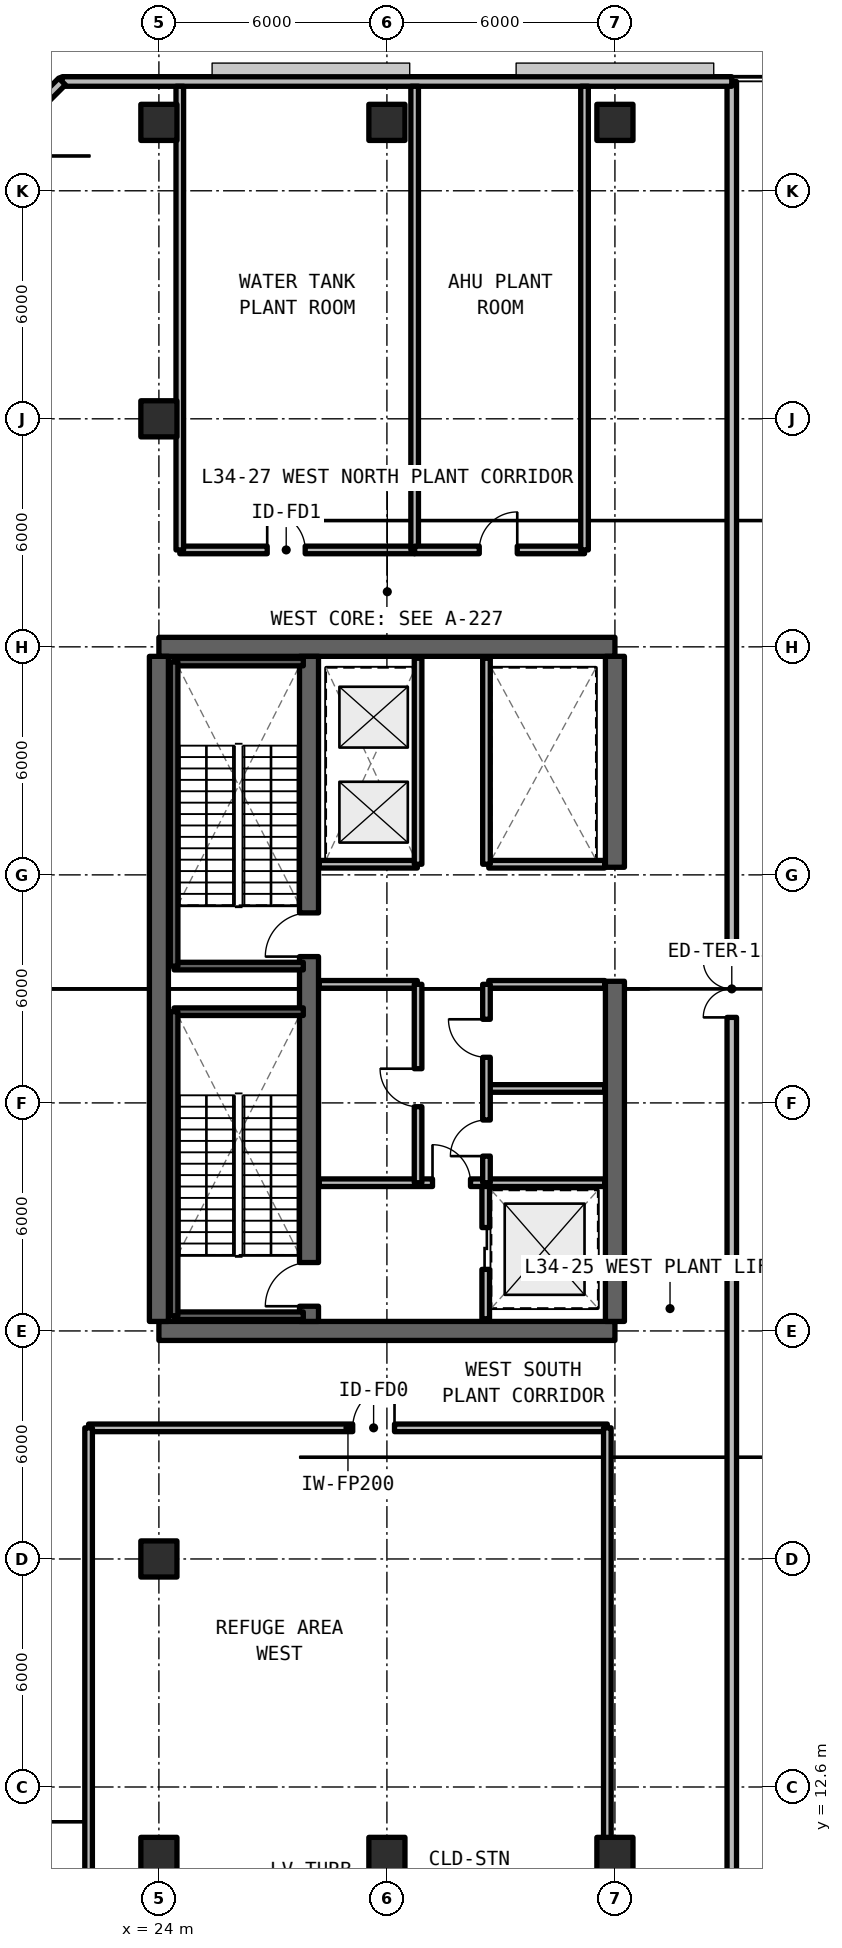
"""IFC4 building model, lengths in metres.
Left out: names, types, materials, properties, quantities, classifications, styles, units other than length and angle.
Written with IfcOpenShell. Run it as: python <this file> out.ifc"""

import sys

from ifc_helpers import new_model, si_unit, direction, frame, frame_2d, origin, origin_2d, place, context, subcontext, project, spatial, rectangle, extrude, element, fill, save


model = new_model("IFC4")
c1 = context("Model", 3, precision=1e-05, world=origin(), true_north=direction((0.0, 1.0)))
c2 = subcontext(c1, "Body", "Model", "MODEL_VIEW")
j1 = project(units=[si_unit("LENGTHUNIT", "METRE"), si_unit("PLANEANGLEUNIT", "RADIAN")], contexts=[c1])
p1 = place(None, origin())
s1 = spatial("IfcSite", under=j1, at=p1, CompositionType="ELEMENT")
p2 = place(p1, origin())
s2 = spatial("IfcBuilding", under=s1, at=p2, CompositionType="ELEMENT")
p3 = place(p2, frame((0.0, 0.0, 123.09)))
s3 = spatial("IfcBuildingStorey", under=s2, at=p3, CompositionType="ELEMENT", Elevation=123.09)
for number, where, z_axis, x_axis in (
    (1, (24.0, 24.6, 0.0), (0.0, 0.0, 1.0), (1.0, 0.0, 0.0)),
    (2, (36.0, 42.6, 0.0), (0.0, 0.0, 1.0), (-1.0, 0.0, 0.0)),
):
    element("IfcWall", number, at=place(p3, frame(where, z_axis=z_axis, x_axis=x_axis)), inside=s3, PredefinedType="SHEAR", context=c2, shape_type="SweptSolid", body=[
        extrude(rectangle(XDim=12.0, YDim=0.5, at=frame_2d((6.0, 0.0))), origin(), (0.0, 0.0, 1.0), 4.95),
    ])
p4 = place(p3, frame((24.0, 24.85, 0.0), z_axis=(0.0, 0.0, 1.0), x_axis=(0.0, 1.0, 0.0)))
e3 = element("IfcWall", 3, at=p4, inside=s3, PredefinedType="SHEAR", context=c2, shape_type="SweptSolid", body=[
    extrude(rectangle(XDim=17.5, YDim=0.5, at=frame_2d((8.75, 0.0))), origin(), (0.0, 0.0, 1.0), 4.95),
])
p5 = place(p3, frame((36.0, 24.85, 0.0), z_axis=(0.0, 0.0, 1.0), x_axis=(0.0, 1.0, 0.0)))
e4 = element("IfcWall", 4, at=p5, inside=s3, PredefinedType="SHEAR", context=c2, shape_type="SweptSolid", body=[
    extrude(rectangle(XDim=8.95, YDim=0.5, at=frame_2d((4.475, 0.0))), origin(), (0.0, 0.0, 1.0), 4.95),
])
p6 = place(p3, frame((36.0, 36.8, 0.0), z_axis=(0.0, 0.0, 1.0), x_axis=(0.0, 1.0, 0.0)))
e5 = element("IfcWall", 5, at=p6, inside=s3, PredefinedType="SHEAR", context=c2, shape_type="SweptSolid", body=[
    extrude(rectangle(XDim=5.55, YDim=0.5, at=frame_2d((2.775, 0.0))), origin(), (0.0, 0.0, 1.0), 4.95),
])
p7 = place(p3, frame((27.95, 24.85, 0.0), z_axis=(0.0, 0.0, 1.0), x_axis=(0.0, 1.0, 0.0)))
e6 = element("IfcWall", 6, at=p7, inside=s3, PredefinedType="SHEAR", context=c2, shape_type="SweptSolid", body=[
    extrude(rectangle(XDim=17.5, YDim=0.5, at=frame_2d((8.75, 0.0))), origin(), (0.0, 0.0, 1.0), 4.95),
])
p8 = place(p7, frame((0.4, 0.0, 0.0)))
e7 = element("IfcOpeningElement", 7, at=p8, cuts=e6, PredefinedType="OPENING", context=c2, shape_type="SweptSolid", body=[
    extrude(rectangle(XDim=1.15, YDim=2.15, at=frame_2d((0.575, 1.075))), frame((0.0, 0.26, 0.0), z_axis=(0.0, -1.0, 0.0), x_axis=(1.0, 0.0, 0.0)), (0.0, 0.0, 1.0), 0.52),
])
p9 = place(p7, frame((9.6, 0.0, 0.0)))
e8 = element("IfcOpeningElement", 8, at=p9, cuts=e6, PredefinedType="OPENING", context=c2, shape_type="SweptSolid", body=[
    extrude(rectangle(XDim=1.15, YDim=2.15, at=frame_2d((0.575, 1.075))), frame((0.0, 0.26, 0.0), z_axis=(0.0, -1.0, 0.0), x_axis=(1.0, 0.0, 0.0)), (0.0, 0.0, 1.0), 0.52),
])
for number, where, z_axis, x_axis in (
    (9, (24.0, 18.6, 0.0), (0.0, 0.0, 1.0), (1.0, 0.0, 0.0)),
    (10, (24.0, 48.6, 0.0), (0.0, 0.0, 1.0), (1.0, 0.0, 0.0)),
):
    element("IfcColumn", number, at=place(p3, frame(where, z_axis=z_axis, x_axis=x_axis)), inside=s3, PredefinedType="COLUMN", context=c2, shape_type="SweptSolid", body=[
        extrude(rectangle(XDim=0.95, YDim=0.95, at=origin_2d()), origin(), (0.0, 0.0, 1.0), 4.95),
    ])
for number, where, z_axis, x_axis in (
    (11, (24.0, 10.8, 0.0), (0.0, 0.0, 1.0), (1.0, 0.0, 0.0)),
    (12, (24.0, 56.4, 0.0), (0.0, 0.0, 1.0), (1.0, 0.0, 0.0)),
    (13, (30.0, 10.8, 0.0), (0.0, 0.0, 1.0), (1.0, 0.0, 0.0)),
    (14, (30.0, 56.4, 0.0), (0.0, 0.0, 1.0), (1.0, 0.0, 0.0)),
    (15, (36.0, 10.8, 0.0), (0.0, 0.0, 1.0), (1.0, 0.0, 0.0)),
    (16, (36.0, 56.4, 0.0), (0.0, 0.0, 1.0), (1.0, 0.0, 0.0)),
):
    element("IfcColumn", number, at=place(p3, frame(where, z_axis=z_axis, x_axis=x_axis)), inside=s3, PredefinedType="COLUMN", context=c2, shape_type="SweptSolid", body=[
        extrude(rectangle(XDim=0.95, YDim=0.95, at=origin_2d()), origin(), (0.0, 0.0, 1.0), 4.67),
    ])
p10 = place(p3, frame((39.075, 9.725, 0.0), z_axis=(0.0, 0.0, 1.0), x_axis=(0.0, 1.0, 0.0)))
e17 = element("IfcWall", 17, at=p10, inside=s3, PredefinedType="SOLIDWALL", context=c2, shape_type="SweptSolid", body=[
    extrude(rectangle(XDim=47.75, YDim=0.25, at=frame_2d((23.875, 0.0))), origin(), (0.0, 0.0, 1.0), 4.67),
])
p11 = place(p10, frame((23.125, 0.0, 0.0)))
e18 = element("IfcOpeningElement", 18, at=p11, cuts=e17, PredefinedType="OPENING", context=c2, shape_type="SweptSolid", body=[
    extrude(rectangle(XDim=1.5, YDim=2.2, at=frame_2d((0.75, 1.1))), frame((0.0, 0.135, 0.0), z_axis=(0.0, -1.0, 0.0), x_axis=(1.0, 0.0, 0.0)), (0.0, 0.0, 1.0), 0.27),
])
p12 = place(p3, frame((39.075, 57.475, 0.0), z_axis=(0.0, 0.0, 1.0), x_axis=(-1.0, 0.0, 0.0)))
e19 = element("IfcWall", 19, at=p12, inside=s3, PredefinedType="SOLIDWALL", context=c2, shape_type="SweptSolid", body=[
    extrude(rectangle(XDim=17.623, YDim=0.25, at=frame_2d((8.812, 0.0))), origin(), (0.0, 0.0, 1.0), 4.67),
])
p13 = place(p3, frame((21.452, 57.475, 0.0), z_axis=(0.0, 0.0, 1.0), x_axis=(-0.707106781187, -0.707106781187, 0.0)))
e20 = element("IfcWall", 20, at=p13, inside=s3, PredefinedType="SOLIDWALL", context=c2, shape_type="SweptSolid", body=[
    extrude(rectangle(XDim=5.836, YDim=0.25, at=frame_2d((2.918, 0.0))), origin(), (0.0, 0.0, 1.0), 4.67),
])
p14 = place(p3, frame((17.325, 13.852, 0.0), z_axis=(0.0, 0.0, 1.0), x_axis=(0.707127696864, -0.70708586489, 0.0)))
e21 = element("IfcWall", 21, at=p14, inside=s3, PredefinedType="SOLIDWALL", context=c2, shape_type="SweptSolid", body=[
    extrude(rectangle(XDim=5.836, YDim=0.25, at=frame_2d((2.918, 0.0))), origin(), (0.0, 0.0, 1.0), 4.67),
])
p15 = place(p3, frame((32.6, 24.92, 0.0), z_axis=(0.0, 0.0, 1.0), x_axis=(0.0, 1.0, 0.0)))
e22 = element("IfcWall", 22, at=p15, inside=s3, PredefinedType="SOLIDWALL", context=c2, shape_type="SweptSolid", body=[
    extrude(rectangle(XDim=3.58, YDim=0.2, at=frame_2d((1.79, 0.0))), origin(), (0.0, 0.0, 1.0), 3.89),
])
p16 = place(p15, frame((1.3, 0.0, 0.0)))
e23 = element("IfcOpeningElement", 23, at=p16, cuts=e22, PredefinedType="OPENING", context=c2, shape_type="SweptSolid", body=[
    extrude(rectangle(XDim=1.1, YDim=2.2, at=frame_2d((0.55, 1.1))), frame((0.0, 0.11, 0.0), z_axis=(0.0, -1.0, 0.0), x_axis=(1.0, 0.0, 0.0)), (0.0, 0.0, 1.0), 0.22),
])
p17 = place(p3, frame((28.22, 28.5, 0.0), z_axis=(0.0, 0.0, 1.0), x_axis=(1.0, 0.0, 0.0)))
e24 = element("IfcWall", 24, at=p17, inside=s3, PredefinedType="SOLIDWALL", context=c2, shape_type="SweptSolid", body=[
    extrude(rectangle(XDim=7.51, YDim=0.2, at=frame_2d((3.755, 0.0))), origin(), (0.0, 0.0, 1.0), 3.89),
])
p18 = place(p17, frame((2.98, 0.0, 0.0)))
e25 = element("IfcOpeningElement", 25, at=p18, cuts=e24, PredefinedType="OPENING", context=c2, shape_type="SweptSolid", body=[
    extrude(rectangle(XDim=1.0, YDim=2.15, at=frame_2d((0.5, 1.075))), frame((0.0, 0.11, 0.0), z_axis=(0.0, -1.0, 0.0), x_axis=(1.0, 0.0, 0.0)), (0.0, 0.0, 1.0), 0.22),
])
p19 = place(p3, frame((28.22, 33.72, 0.0), z_axis=(0.0, 0.0, 1.0), x_axis=(1.0, 0.0, 0.0)))
e26 = element("IfcWall", 26, at=p19, inside=s3, PredefinedType="SOLIDWALL", context=c2, shape_type="SweptSolid", body=[
    extrude(rectangle(XDim=2.58, YDim=0.2, at=frame_2d((1.29, 0.0))), origin(), (0.0, 0.0, 1.0), 3.89),
])
p20 = place(p3, frame((30.82, 28.5, 0.0), z_axis=(0.0, 0.0, 1.0), x_axis=(0.0, 1.0, 0.0)))
e27 = element("IfcWall", 27, at=p20, inside=s3, PredefinedType="SOLIDWALL", context=c2, shape_type="SweptSolid", body=[
    extrude(rectangle(XDim=5.22, YDim=0.2, at=frame_2d((2.61, 0.0))), origin(), (0.0, 0.0, 1.0), 3.89),
])
p21 = place(p20, frame((2.0, 0.0, 0.0)))
e28 = element("IfcOpeningElement", 28, at=p21, cuts=e27, PredefinedType="OPENING", context=c2, shape_type="SweptSolid", body=[
    extrude(rectangle(XDim=1.0, YDim=2.15, at=frame_2d((0.5, 1.075))), frame((0.0, 0.11, 0.0), z_axis=(0.0, -1.0, 0.0), x_axis=(1.0, 0.0, 0.0)), (0.0, 0.0, 1.0), 0.22),
])
for number, where, z_axis, x_axis in (
    (29, (32.68, 30.98, 0.0), (0.0, 0.0, 1.0), (1.0, 0.0, 0.0)),
    (30, (32.68, 33.72, 0.0), (0.0, 0.0, 1.0), (1.0, 0.0, 0.0)),
):
    element("IfcWall", number, at=place(p3, frame(where, z_axis=z_axis, x_axis=x_axis)), inside=s3, PredefinedType="SOLIDWALL", context=c2, shape_type="SweptSolid", body=[
        extrude(rectangle(XDim=3.05, YDim=0.2, at=frame_2d((1.525, 0.0))), origin(), (0.0, 0.0, 1.0), 3.89),
    ])
p22 = place(p3, frame((32.62, 28.5, 0.0), z_axis=(0.0, 0.0, 1.0), x_axis=(0.0, 1.0, 0.0)))
e31 = element("IfcWall", 31, at=p22, inside=s3, PredefinedType="SOLIDWALL", context=c2, shape_type="SweptSolid", body=[
    extrude(rectangle(XDim=5.22, YDim=0.2, at=frame_2d((2.61, 0.0))), origin(), (0.0, 0.0, 1.0), 3.89),
])
p23 = place(p22, frame((0.7, 0.0, 0.0)))
e32 = element("IfcOpeningElement", 32, at=p23, cuts=e31, PredefinedType="OPENING", context=c2, shape_type="SweptSolid", body=[
    extrude(rectangle(XDim=0.95, YDim=2.15, at=frame_2d((0.475, 1.075))), frame((0.0, 0.11, 0.0), z_axis=(0.0, -1.0, 0.0), x_axis=(1.0, 0.0, 0.0)), (0.0, 0.0, 1.0), 0.22),
])
p24 = place(p22, frame((3.3, 0.0, 0.0)))
e33 = element("IfcOpeningElement", 33, at=p24, cuts=e31, PredefinedType="OPENING", context=c2, shape_type="SweptSolid", body=[
    extrude(rectangle(XDim=1.0, YDim=2.15, at=frame_2d((0.5, 1.075))), frame((0.0, 0.11, 0.0), z_axis=(0.0, -1.0, 0.0), x_axis=(1.0, 0.0, 0.0)), (0.0, 0.0, 1.0), 0.22),
])
p25 = place(p3, frame((28.22, 36.88, 0.0), z_axis=(0.0, 0.0, 1.0), x_axis=(1.0, 0.0, 0.0)))
e34 = element("IfcWall", 34, at=p25, inside=s3, PredefinedType="SOLIDWALL", context=c2, shape_type="SweptSolid", body=[
    extrude(rectangle(XDim=2.58, YDim=0.2, at=frame_2d((1.29, 0.0))), origin(), (0.0, 0.0, 1.0), 3.89),
])
p26 = place(p3, frame((30.82, 36.88, 0.0), z_axis=(0.0, 0.0, 1.0), x_axis=(0.0, 1.0, 0.0)))
e35 = element("IfcWall", 35, at=p26, inside=s3, PredefinedType="SOLIDWALL", context=c2, shape_type="SweptSolid", body=[
    extrude(rectangle(XDim=5.42, YDim=0.2, at=frame_2d((2.71, 0.0))), origin(), (0.0, 0.0, 1.0), 3.89),
])
p27 = place(p3, frame((32.68, 36.88, 0.0), z_axis=(0.0, 0.0, 1.0), x_axis=(1.0, 0.0, 0.0)))
e36 = element("IfcWall", 36, at=p27, inside=s3, PredefinedType="SOLIDWALL", context=c2, shape_type="SweptSolid", body=[
    extrude(rectangle(XDim=3.05, YDim=0.2, at=frame_2d((1.525, 0.0))), origin(), (0.0, 0.0, 1.0), 3.89),
])
p28 = place(p3, frame((32.62, 36.88, 0.0), z_axis=(0.0, 0.0, 1.0), x_axis=(0.0, 1.0, 0.0)))
e37 = element("IfcWall", 37, at=p28, inside=s3, PredefinedType="SOLIDWALL", context=c2, shape_type="SweptSolid", body=[
    extrude(rectangle(XDim=5.42, YDim=0.2, at=frame_2d((2.71, 0.0))), origin(), (0.0, 0.0, 1.0), 3.89),
])
p29 = place(p3, frame((22.15, 22.05, 0.0), z_axis=(0.0, 0.0, 1.0), x_axis=(1.0, 0.0, 0.0)))
e38 = element("IfcWall", 38, at=p29, inside=s3, PredefinedType="SOLIDWALL", context=c2, shape_type="SweptSolid", body=[
    extrude(rectangle(XDim=13.65, YDim=0.2, at=frame_2d((6.825, 0.0))), origin(), (0.0, 0.0, 1.0), 3.89),
])
p30 = place(p29, frame((6.95, 0.0, 0.0)))
e39 = element("IfcOpeningElement", 39, at=p30, cuts=e38, PredefinedType="OPENING", context=c2, shape_type="SweptSolid", body=[
    extrude(rectangle(XDim=1.1, YDim=2.15, at=frame_2d((0.55, 1.075))), frame((0.0, 0.11, 0.0), z_axis=(0.0, -1.0, 0.0), x_axis=(1.0, 0.0, 0.0)), (0.0, 0.0, 1.0), 0.22),
])
p31 = place(p3, frame((22.15, 9.85, 0.0), z_axis=(0.0, 0.0, 1.0), x_axis=(0.0, 1.0, 0.0)))
e40 = element("IfcWall", 40, at=p31, inside=s3, PredefinedType="SOLIDWALL", context=c2, shape_type="SweptSolid", body=[
    extrude(rectangle(XDim=12.2, YDim=0.2, at=frame_2d((6.1, 0.0))), origin(), (0.0, 0.0, 1.0), 3.89),
])
p32 = place(p3, frame((35.8, 9.85, 0.0), z_axis=(0.0, 0.0, 1.0), x_axis=(0.0, 1.0, 0.0)))
e41 = element("IfcWall", 41, at=p32, inside=s3, PredefinedType="SOLIDWALL", context=c2, shape_type="SweptSolid", body=[
    extrude(rectangle(XDim=12.2, YDim=0.2, at=frame_2d((6.1, 0.0))), origin(), (0.0, 0.0, 1.0), 3.647),
])
p33 = place(p3, frame((24.55, 45.15, 0.0), z_axis=(0.0, 0.0, 1.0), x_axis=(1.0, 0.0, 0.0)))
e42 = element("IfcWall", 42, at=p33, inside=s3, PredefinedType="SOLIDWALL", context=c2, shape_type="SweptSolid", body=[
    extrude(rectangle(XDim=6.18, YDim=0.2, at=frame_2d((3.09, 0.0))), origin(), (0.0, 0.0, 1.0), 3.89),
])
p34 = place(p33, frame((2.3, 0.0, 0.0)))
e43 = element("IfcOpeningElement", 43, at=p34, cuts=e42, PredefinedType="OPENING", context=c2, shape_type="SweptSolid", body=[
    extrude(rectangle(XDim=1.0, YDim=2.15, at=frame_2d((0.5, 1.075))), frame((0.0, 0.11, 0.0), z_axis=(0.0, -1.0, 0.0), x_axis=(1.0, 0.0, 0.0)), (0.0, 0.0, 1.0), 0.22),
])
for number, where, z_axis, x_axis in (
    (44, (24.55, 45.15, 0.0), (0.0, 0.0, 1.0), (0.0, 1.0, 0.0)),
    (45, (30.73, 45.15, 0.0), (0.0, 0.0, 1.0), (0.0, 1.0, 0.0)),
):
    element("IfcWall", number, at=place(p3, frame(where, z_axis=z_axis, x_axis=x_axis)), inside=s3, PredefinedType="SOLIDWALL", context=c2, shape_type="SweptSolid", body=[
        extrude(rectangle(XDim=12.2, YDim=0.2, at=frame_2d((6.1, 0.0))), origin(), (0.0, 0.0, 1.0), 3.89),
    ])
p35 = place(p3, frame((30.73, 45.15, 0.0), z_axis=(0.0, 0.0, 1.0), x_axis=(1.0, 0.0, 0.0)))
e46 = element("IfcWall", 46, at=p35, inside=s3, PredefinedType="SOLIDWALL", context=c2, shape_type="SweptSolid", body=[
    extrude(rectangle(XDim=4.47, YDim=0.2, at=frame_2d((2.235, 0.0))), origin(), (0.0, 0.0, 1.0), 3.89),
])
p36 = place(p35, frame((1.7, 0.0, 0.0)))
e47 = element("IfcOpeningElement", 47, at=p36, cuts=e46, PredefinedType="OPENING", context=c2, shape_type="SweptSolid", body=[
    extrude(rectangle(XDim=1.0, YDim=2.15, at=frame_2d((0.5, 1.075))), frame((0.0, 0.11, 0.0), z_axis=(0.0, -1.0, 0.0), x_axis=(1.0, 0.0, 0.0)), (0.0, 0.0, 1.0), 0.22),
])
p37 = place(p3, frame((35.2, 45.15, 0.0), z_axis=(0.0, 0.0, 1.0), x_axis=(0.0, 1.0, 0.0)))
e48 = element("IfcWall", 48, at=p37, inside=s3, PredefinedType="SOLIDWALL", context=c2, shape_type="SweptSolid", body=[
    extrude(rectangle(XDim=12.2, YDim=0.2, at=frame_2d((6.1, 0.0))), origin(), (0.0, 0.0, 1.0), 3.89),
])
for number, where, z_axis, x_axis in (
    (49, (24.4, 25.0, 0.0), (0.0, 0.0, 1.0), (1.0, 0.0, 0.0)),
    (50, (27.8, 33.0, 0.0), (0.0, 0.0, 1.0), (-1.0, 0.0, 0.0)),
):
    element("IfcWall", number, at=place(p3, frame(where, z_axis=z_axis, x_axis=x_axis)), inside=s3, PredefinedType="SOLIDWALL", context=c2, shape_type="SweptSolid", body=[
        extrude(rectangle(XDim=3.4, YDim=0.2, at=frame_2d((1.7, 0.0))), origin(), (0.0, 0.0, 1.0), 4.95),
    ])
p38 = place(p3, frame((24.4, 33.0, 0.0), z_axis=(0.0, 0.0, 1.0), x_axis=(0.0, -1.0, 0.0)))
e51 = element("IfcWall", 51, at=p38, inside=s3, PredefinedType="SOLIDWALL", context=c2, shape_type="SweptSolid", body=[
    extrude(rectangle(XDim=8.0, YDim=0.2, at=frame_2d((4.0, 0.0))), origin(), (0.0, 0.0, 1.0), 4.95),
])
for number, where, z_axis, x_axis in (
    (52, (24.4, 34.2, 0.0), (0.0, 0.0, 1.0), (1.0, 0.0, 0.0)),
    (53, (27.8, 42.2, 0.0), (0.0, 0.0, 1.0), (-1.0, 0.0, 0.0)),
):
    element("IfcWall", number, at=place(p3, frame(where, z_axis=z_axis, x_axis=x_axis)), inside=s3, PredefinedType="SOLIDWALL", context=c2, shape_type="SweptSolid", body=[
        extrude(rectangle(XDim=3.4, YDim=0.2, at=frame_2d((1.7, 0.0))), origin(), (0.0, 0.0, 1.0), 4.95),
    ])
p39 = place(p3, frame((24.4, 42.2, 0.0), z_axis=(0.0, 0.0, 1.0), x_axis=(0.0, -1.0, 0.0)))
e54 = element("IfcWall", 54, at=p39, inside=s3, PredefinedType="SOLIDWALL", context=c2, shape_type="SweptSolid", body=[
    extrude(rectangle(XDim=8.0, YDim=0.2, at=frame_2d((4.0, 0.0))), origin(), (0.0, 0.0, 1.0), 4.95),
])
p40 = place(p11, origin())
e55 = element("IfcDoor", 55, at=p40, inside=s3, OperationType="SINGLE_SWING_RIGHT", PredefinedType="DOOR", context=c2, shape_type="SweptSolid", body=[
    extrude(rectangle(XDim=1.5, YDim=2.2, at=frame_2d((0.75, 1.1))), frame((0.0, 0.025, 0.0), z_axis=(0.0, -1.0, 0.0), x_axis=(1.0, 0.0, 0.0)), (0.0, 0.0, 1.0), 0.05),
])
fill(e18, e55)
p41 = place(p16, origin())
e56 = element("IfcDoor", 56, at=p41, inside=s3, OperationType="SLIDING_TO_LEFT", PredefinedType="DOOR", context=c2, shape_type="SweptSolid", body=[
    extrude(rectangle(XDim=1.1, YDim=2.2, at=frame_2d((0.55, 1.1))), frame((0.0, 0.025, 0.0), z_axis=(0.0, -1.0, 0.0), x_axis=(1.0, 0.0, 0.0)), (0.0, 0.0, 1.0), 0.05),
])
fill(e23, e56)
p42 = place(p18, origin())
e57 = element("IfcDoor", 57, at=p42, inside=s3, OperationType="SINGLE_SWING_LEFT", PredefinedType="DOOR", context=c2, shape_type="SweptSolid", body=[
    extrude(rectangle(XDim=1.0, YDim=2.15, at=frame_2d((0.5, 1.075))), frame((0.0, 0.025, 0.0), z_axis=(0.0, -1.0, 0.0), x_axis=(1.0, 0.0, 0.0)), (0.0, 0.0, 1.0), 0.05),
])
fill(e25, e57)
p43 = place(p21, origin())
e58 = element("IfcDoor", 58, at=p43, inside=s3, OperationType="SINGLE_SWING_RIGHT", PredefinedType="DOOR", context=c2, shape_type="SweptSolid", body=[
    extrude(rectangle(XDim=1.0, YDim=2.15, at=frame_2d((0.5, 1.075))), frame((0.0, 0.025, 0.0), z_axis=(0.0, -1.0, 0.0), x_axis=(1.0, 0.0, 0.0)), (0.0, 0.0, 1.0), 0.05),
])
fill(e28, e58)
p44 = place(p23, origin())
e59 = element("IfcDoor", 59, at=p44, inside=s3, OperationType="SINGLE_SWING_LEFT", PredefinedType="DOOR", context=c2, shape_type="SweptSolid", body=[
    extrude(rectangle(XDim=0.95, YDim=2.15, at=frame_2d((0.475, 1.075))), frame((0.0, 0.025, 0.0), z_axis=(0.0, -1.0, 0.0), x_axis=(1.0, 0.0, 0.0)), (0.0, 0.0, 1.0), 0.05),
])
fill(e32, e59)
p45 = place(p24, origin())
e60 = element("IfcDoor", 60, at=p45, inside=s3, OperationType="SINGLE_SWING_RIGHT", PredefinedType="DOOR", context=c2, shape_type="SweptSolid", body=[
    extrude(rectangle(XDim=1.0, YDim=2.15, at=frame_2d((0.5, 1.075))), frame((0.0, 0.025, 0.0), z_axis=(0.0, -1.0, 0.0), x_axis=(1.0, 0.0, 0.0)), (0.0, 0.0, 1.0), 0.05),
])
fill(e33, e60)
p46 = place(p30, origin())
e61 = element("IfcDoor", 61, at=p46, inside=s3, OperationType="SINGLE_SWING_RIGHT", PredefinedType="DOOR", context=c2, shape_type="SweptSolid", body=[
    extrude(rectangle(XDim=1.1, YDim=2.15, at=frame_2d((0.55, 1.075))), frame((0.0, 0.025, 0.0), z_axis=(0.0, -1.0, 0.0), x_axis=(1.0, 0.0, 0.0)), (0.0, 0.0, 1.0), 0.05),
])
fill(e39, e61)
p47 = place(p34, origin())
e62 = element("IfcDoor", 62, at=p47, inside=s3, OperationType="SINGLE_SWING_LEFT", PredefinedType="DOOR", context=c2, shape_type="SweptSolid", body=[
    extrude(rectangle(XDim=1.0, YDim=2.15, at=frame_2d((0.5, 1.075))), frame((0.0, 0.025, 0.0), z_axis=(0.0, -1.0, 0.0), x_axis=(1.0, 0.0, 0.0)), (0.0, 0.0, 1.0), 0.05),
])
fill(e43, e62)
p48 = place(p36, origin())
e63 = element("IfcDoor", 63, at=p48, inside=s3, OperationType="SINGLE_SWING_RIGHT", PredefinedType="DOOR", context=c2, shape_type="SweptSolid", body=[
    extrude(rectangle(XDim=1.0, YDim=2.15, at=frame_2d((0.5, 1.075))), frame((0.0, 0.025, 0.0), z_axis=(0.0, -1.0, 0.0), x_axis=(1.0, 0.0, 0.0)), (0.0, 0.0, 1.0), 0.05),
])
fill(e47, e63)
p49 = place(p8, origin())
e64 = element("IfcDoor", 64, at=p49, inside=s3, OperationType="SINGLE_SWING_LEFT", PredefinedType="DOOR", context=c2, shape_type="SweptSolid", body=[
    extrude(rectangle(XDim=1.15, YDim=2.15, at=frame_2d((0.575, 1.075))), frame((0.0, 0.025, 0.0), z_axis=(0.0, -1.0, 0.0), x_axis=(1.0, 0.0, 0.0)), (0.0, 0.0, 1.0), 0.05),
])
fill(e7, e64)
p50 = place(p9, origin())
e65 = element("IfcDoor", 65, at=p50, inside=s3, OperationType="SINGLE_SWING_RIGHT", PredefinedType="DOOR", context=c2, shape_type="SweptSolid", body=[
    extrude(rectangle(XDim=1.15, YDim=2.15, at=frame_2d((0.575, 1.075))), frame((0.0, 0.025, 0.0), z_axis=(0.0, -1.0, 0.0), x_axis=(1.0, 0.0, 0.0)), (0.0, 0.0, 1.0), 0.05),
])
fill(e8, e65)
save(model, sys.argv[1])
